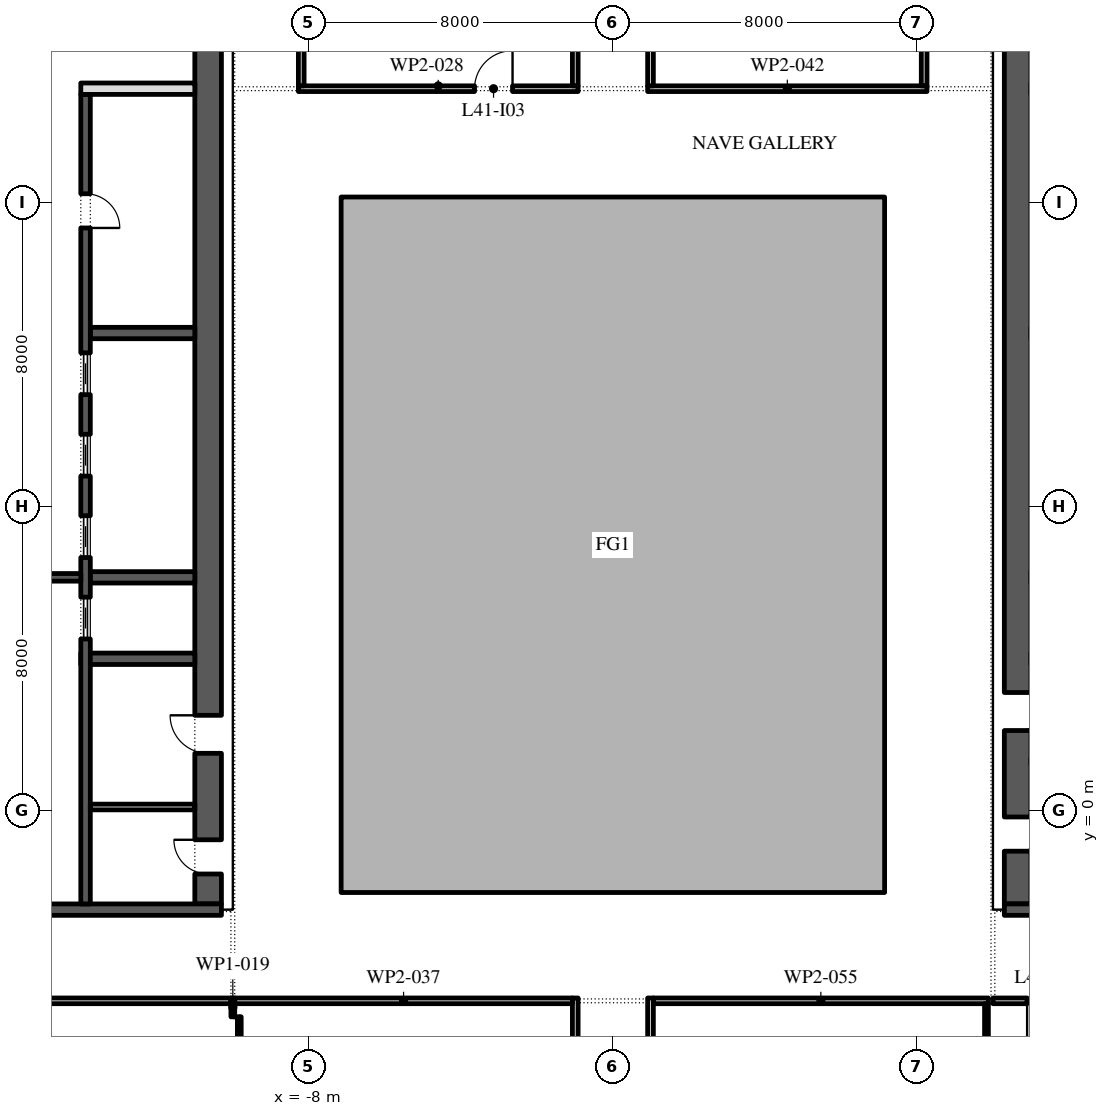
"""IFC4 building model, lengths in metres.
Left out: names, types, materials, properties, quantities, classifications, styles, units other than length and angle.
Written with IfcOpenShell. Run it as: python <this file> out.ifc"""

import sys

from ifc_helpers import new_model, si_unit, direction, frame, frame_2d, origin, place, context, subcontext, project, spatial, polyline, rectangle, outline, extrude, element, fill, save


model = new_model("IFC4")
c1 = context("Model", 3, precision=1e-05, world=origin(), true_north=direction((0.0, 1.0)))
c2 = subcontext(c1, "Body", "Model", "MODEL_VIEW")
j1 = project(units=[si_unit("LENGTHUNIT", "METRE"), si_unit("PLANEANGLEUNIT", "RADIAN")], contexts=[c1])
p1 = place(None, origin())
s1 = spatial("IfcSite", under=j1, at=p1, CompositionType="ELEMENT")
p2 = place(p1, origin())
s2 = spatial("IfcBuilding", under=s1, at=p2, CompositionType="ELEMENT")
p3 = place(p2, frame((0.0, 0.0, 188.4)))
s3 = spatial("IfcBuildingStorey", under=s2, at=p3, CompositionType="ELEMENT", Elevation=188.4)
p4 = place(p3, origin())
e1 = element("IfcWall", 1, at=p4, inside=s3, PredefinedType="STANDARD", context=c2, shape_type="SweptSolid", body=[
    extrude(outline(polyline([(-7.15, -2.15), (7.15, -2.15), (7.15, 16.15), (-7.15, 16.15), (-7.15, -2.15)]), holes=[polyline([(-7.0, -2.0), (-7.0, 16.0), (7.0, 16.0), (7.0, -2.0), (-7.0, -2.0)])]), origin(), (0.0, 0.0, 1.0), 4.0),
])
p5 = place(p3, frame((-10.65, -2.45, 0.0), z_axis=(0.0, 0.0, 1.0), x_axis=(0.0, 1.0, 0.0)))
e2 = element("IfcWall", 2, at=p5, inside=s3, PredefinedType="SHEAR", context=c2, shape_type="SweptSolid", body=[
    extrude(rectangle(XDim=27.9, YDim=0.7, at=frame_2d((13.95, 0.0))), origin(), (0.0, 0.0, 1.0), 4.0),
])
p6 = place(p5, frame((23.65, 0.0, 0.0)))
e3 = element("IfcOpeningElement", 3, at=p6, cuts=e2, PredefinedType="OPENING", context=c2, shape_type="SweptSolid", body=[
    extrude(rectangle(XDim=2.4, YDim=2.1, at=frame_2d((1.2, 1.05))), frame((0.0, 0.36, 0.0), z_axis=(0.0, -1.0, 0.0), x_axis=(1.0, 0.0, 0.0)), (0.0, 0.0, 1.0), 0.72),
])
p7 = place(p5, frame((0.788, 0.0, 0.0)))
e4 = element("IfcOpeningElement", 4, at=p7, cuts=e2, PredefinedType="OPENING", context=c2, shape_type="SweptSolid", body=[
    extrude(rectangle(XDim=0.9, YDim=2.1, at=frame_2d((0.45, 1.05))), frame((0.0, 0.36, 0.0), z_axis=(0.0, -1.0, 0.0), x_axis=(1.0, 0.0, 0.0)), (0.0, 0.0, 1.0), 0.72),
])
p8 = place(p5, frame((3.962, 0.0, 0.0)))
e5 = element("IfcOpeningElement", 5, at=p8, cuts=e2, PredefinedType="OPENING", context=c2, shape_type="SweptSolid", body=[
    extrude(rectangle(XDim=1.0, YDim=2.1, at=frame_2d((0.5, 1.05))), frame((0.0, 0.36, 0.0), z_axis=(0.0, -1.0, 0.0), x_axis=(1.0, 0.0, 0.0)), (0.0, 0.0, 1.0), 0.72),
])
p9 = place(p3, frame((-21.7, -2.6, 0.0), z_axis=(0.0, 0.0, 1.0), x_axis=(1.0, 0.0, 0.0)))
e6 = element("IfcWall", 6, at=p9, inside=s3, PredefinedType="SHEAR", context=c2, shape_type="SweptSolid", body=[
    extrude(rectangle(XDim=11.4, YDim=0.3, at=frame_2d((5.7, 0.0))), origin(), (0.0, 0.0, 1.0), 4.0),
])
p10 = place(p3, frame((-14.0, 4.0, 0.0), z_axis=(0.0, 0.0, 1.0), x_axis=(1.0, 0.0, 0.0)))
e7 = element("IfcWall", 7, at=p10, inside=s3, PredefinedType="SHEAR", context=c2, shape_type="SweptSolid", body=[
    extrude(rectangle(XDim=3.0, YDim=0.3, at=frame_2d((1.5, 0.0))), origin(), (0.0, 0.0, 1.0), 4.0),
])
for number, where, z_axis, x_axis in (
    (8, (-13.75, 6.143, 0.0), (0.0, 0.0, 1.0), (1.0, 0.0, 0.0)),
    (9, (-13.75, 12.571, 0.0), (0.0, 0.0, 1.0), (1.0, 0.0, 0.0)),
):
    element("IfcWall", number, at=place(p3, frame(where, z_axis=z_axis, x_axis=x_axis)), inside=s3, PredefinedType="SHEAR", context=c2, shape_type="SweptSolid", body=[
        extrude(rectangle(XDim=2.75, YDim=0.3, at=frame_2d((1.375, 0.0))), origin(), (0.0, 0.0, 1.0), 4.0),
    ])
p11 = place(p3, frame((-13.875, -2.45, 0.0), z_axis=(0.0, 0.0, 1.0), x_axis=(0.0, 1.0, 0.0)))
e10 = element("IfcWall", 10, at=p11, inside=s3, PredefinedType="SHEAR", context=c2, shape_type="SweptSolid", body=[
    extrude(rectangle(XDim=21.3, YDim=0.25, at=frame_2d((10.65, 0.0))), origin(), (0.0, 0.0, 1.0), 4.0),
])
p12 = place(p11, frame((17.786, 0.0, 0.0)))
e11 = element("IfcOpeningElement", 11, at=p12, cuts=e10, PredefinedType="OPENING", context=c2, shape_type="SweptSolid", body=[
    extrude(rectangle(XDim=0.9, YDim=2.1, at=frame_2d((0.45, 1.05))), frame((0.0, 0.135, 0.0), z_axis=(0.0, -1.0, 0.0), x_axis=(1.0, 0.0, 0.0)), (0.0, 0.0, 1.0), 0.27),
])
p13 = place(p11, frame((6.971, 0.0, 0.0)))
e12 = element("IfcOpeningElement", 12, at=p13, cuts=e10, PredefinedType="OPENING", context=c2, shape_type="SweptSolid", body=[
    extrude(rectangle(XDim=1.1, YDim=2.1, at=frame_2d((0.55, 1.05))), frame((0.0, 0.135, 0.0), z_axis=(0.0, -1.0, 0.0), x_axis=(1.0, 0.0, 0.0)), (0.0, 0.0, 1.0), 0.27),
])
p14 = place(p11, frame((9.114, 0.0, 0.0)))
e13 = element("IfcOpeningElement", 13, at=p14, cuts=e10, PredefinedType="OPENING", context=c2, shape_type="SweptSolid", body=[
    extrude(rectangle(XDim=1.1, YDim=2.1, at=frame_2d((0.55, 1.05))), frame((0.0, 0.135, 0.0), z_axis=(0.0, -1.0, 0.0), x_axis=(1.0, 0.0, 0.0)), (0.0, 0.0, 1.0), 0.27),
])
p15 = place(p11, frame((11.257, 0.0, 0.0)))
e14 = element("IfcOpeningElement", 14, at=p15, cuts=e10, PredefinedType="OPENING", context=c2, shape_type="SweptSolid", body=[
    extrude(rectangle(XDim=1.1, YDim=2.1, at=frame_2d((0.55, 1.05))), frame((0.0, 0.135, 0.0), z_axis=(0.0, -1.0, 0.0), x_axis=(1.0, 0.0, 0.0)), (0.0, 0.0, 1.0), 0.27),
])
p16 = place(p11, frame((13.4, 0.0, 0.0)))
e15 = element("IfcOpeningElement", 15, at=p16, cuts=e10, PredefinedType="OPENING", context=c2, shape_type="SweptSolid", body=[
    extrude(rectangle(XDim=1.1, YDim=2.1, at=frame_2d((0.55, 1.05))), frame((0.0, 0.135, 0.0), z_axis=(0.0, -1.0, 0.0), x_axis=(1.0, 0.0, 0.0)), (0.0, 0.0, 1.0), 0.27),
])
p17 = place(p3, frame((-14.0, 19.0, 0.0), z_axis=(0.0, 0.0, 1.0), x_axis=(1.0, 0.0, 0.0)))
e16 = element("IfcWall", 16, at=p17, inside=s3, PredefinedType="PARTITIONING", context=c2, shape_type="SweptSolid", body=[
    extrude(rectangle(XDim=3.0, YDim=0.3, at=frame_2d((1.5, 0.0))), origin(), (0.0, 0.0, 1.0), 4.0),
])
p18 = place(p3, frame((-18.0, 6.143, 0.0), z_axis=(0.0, 0.0, 1.0), x_axis=(1.0, 0.0, 0.0)))
e17 = element("IfcWall", 17, at=p18, inside=s3, PredefinedType="SHEAR", context=c2, shape_type="SweptSolid", body=[
    extrude(rectangle(XDim=4.0, YDim=0.2, at=frame_2d((2.0, 0.0))), origin(), (0.0, 0.0, 1.0), 4.0),
])
p19 = place(p18, frame((1.4, 0.0, 0.0)))
e18 = element("IfcOpeningElement", 18, at=p19, cuts=e17, PredefinedType="OPENING", context=c2, shape_type="SweptSolid", body=[
    extrude(rectangle(XDim=1.2, YDim=2.1, at=frame_2d((0.6, 1.05))), frame((0.0, 0.11, 0.0), z_axis=(0.0, -1.0, 0.0), x_axis=(1.0, 0.0, 0.0)), (0.0, 0.0, 1.0), 0.22),
])
p20 = place(p3, frame((-13.75, 0.1, 0.0), z_axis=(0.0, 0.0, 1.0), x_axis=(1.0, 0.0, 0.0)))
e19 = element("IfcWall", 19, at=p20, inside=s3, PredefinedType="PARTITIONING", context=c2, shape_type="SweptSolid", body=[
    extrude(rectangle(XDim=2.75, YDim=0.15, at=frame_2d((1.375, 0.0))), origin(), (0.0, 0.0, 1.0), 4.0),
])
p21 = place(p3, frame((10.65, -2.45, 0.0), z_axis=(0.0, 0.0, 1.0), x_axis=(0.0, 1.0, 0.0)))
e20 = element("IfcWall", 20, at=p21, inside=s3, PredefinedType="SHEAR", context=c2, shape_type="SweptSolid", body=[
    extrude(rectangle(XDim=27.9, YDim=0.7, at=frame_2d((13.95, 0.0))), origin(), (0.0, 0.0, 1.0), 4.0),
])
p22 = place(p21, frame((23.65, 0.0, 0.0)))
e21 = element("IfcOpeningElement", 21, at=p22, cuts=e20, PredefinedType="OPENING", context=c2, shape_type="SweptSolid", body=[
    extrude(rectangle(XDim=2.4, YDim=2.1, at=frame_2d((1.2, 1.05))), frame((0.0, 0.36, 0.0), z_axis=(0.0, -1.0, 0.0), x_axis=(1.0, 0.0, 0.0)), (0.0, 0.0, 1.0), 0.72),
])
p23 = place(p21, frame((1.387, 0.0, 0.0)))
e22 = element("IfcOpeningElement", 22, at=p23, cuts=e20, PredefinedType="OPENING", context=c2, shape_type="SweptSolid", body=[
    extrude(rectangle(XDim=0.9, YDim=2.1, at=frame_2d((0.45, 1.05))), frame((0.0, 0.36, 0.0), z_axis=(0.0, -1.0, 0.0), x_axis=(1.0, 0.0, 0.0)), (0.0, 0.0, 1.0), 0.72),
])
p24 = place(p21, frame((4.562, 0.0, 0.0)))
e23 = element("IfcOpeningElement", 23, at=p24, cuts=e20, PredefinedType="OPENING", context=c2, shape_type="SweptSolid", body=[
    extrude(rectangle(XDim=1.0, YDim=2.1, at=frame_2d((0.5, 1.05))), frame((0.0, 0.36, 0.0), z_axis=(0.0, -1.0, 0.0), x_axis=(1.0, 0.0, 0.0)), (0.0, 0.0, 1.0), 0.72),
])
p25 = place(p3, frame((10.3, -2.6, 0.0), z_axis=(0.0, 0.0, 1.0), x_axis=(1.0, 0.0, 0.0)))
e24 = element("IfcWall", 24, at=p25, inside=s3, PredefinedType="SHEAR", context=c2, shape_type="SweptSolid", body=[
    extrude(rectangle(XDim=11.4, YDim=0.3, at=frame_2d((5.7, 0.0))), origin(), (0.0, 0.0, 1.0), 4.0),
])
p26 = place(p3, frame((-10.0, -5.42, 0.0), z_axis=(0.0, 0.0, 1.0), x_axis=(0.0, 1.0, 0.0)))
e25 = element("IfcWall", 25, at=p26, inside=s3, PredefinedType="PARTITIONING", context=c2, shape_type="SweptSolid", body=[
    extrude(rectangle(XDim=0.495, YDim=0.1, at=frame_2d((0.248, 0.0))), origin(), (0.0, 0.0, 1.0), 4.0),
])
p27 = place(p3, frame((-10.05, -5.0, 0.0), z_axis=(0.0, 0.0, 1.0), x_axis=(-1.0, 0.0, 0.0)))
e26 = element("IfcWall", 26, at=p27, inside=s3, PredefinedType="PARTITIONING", context=c2, shape_type="SweptSolid", body=[
    extrude(rectangle(XDim=13.665, YDim=0.15, at=frame_2d((6.833, 0.0))), origin(), (0.0, 0.0, 1.0), 4.0),
])
p28 = place(p27, frame((5.09, 0.0, 0.0)))
e27 = element("IfcOpeningElement", 27, at=p28, cuts=e26, PredefinedType="OPENING", context=c2, shape_type="SweptSolid", body=[
    extrude(rectangle(XDim=1.0, YDim=2.1, at=frame_2d((0.5, 1.05))), frame((0.0, 0.085, 0.0), z_axis=(0.0, -1.0, 0.0), x_axis=(1.0, 0.0, 0.0)), (0.0, 0.0, 1.0), 0.17),
])
p29 = place(p3, frame((-9.83, -11.12, 0.0), z_axis=(0.0, 0.0, 1.0), x_axis=(0.0, 1.0, 0.0)))
e28 = element("IfcWall", 28, at=p29, inside=s3, PredefinedType="PARTITIONING", context=c2, shape_type="SweptSolid", body=[
    extrude(rectangle(XDim=5.7, YDim=0.1, at=frame_2d((2.85, 0.0))), origin(), (0.0, 0.0, 1.0), 4.0),
])
p30 = place(p3, frame((-8.275, 19.0, 0.0), z_axis=(0.0, 0.0, 1.0), x_axis=(1.0, 0.0, 0.0)))
e29 = element("IfcWall", 29, at=p30, inside=s3, PredefinedType="PARTITIONING", context=c2, shape_type="SweptSolid", body=[
    extrude(rectangle(XDim=7.36, YDim=0.15, at=frame_2d((3.68, 0.0))), origin(), (0.0, 0.0, 1.0), 4.0),
])
p31 = place(p30, frame((4.635, 0.0, 0.0)))
e30 = element("IfcOpeningElement", 30, at=p31, cuts=e29, PredefinedType="OPENING", context=c2, shape_type="SweptSolid", body=[
    extrude(rectangle(XDim=1.0, YDim=2.1, at=frame_2d((0.5, 1.05))), frame((0.0, 0.085, 0.0), z_axis=(0.0, -1.0, 0.0), x_axis=(1.0, 0.0, 0.0)), (0.0, 0.0, 1.0), 0.17),
])
p32 = place(p3, frame((-8.2, 23.565, 0.0), z_axis=(0.0, 0.0, 1.0), x_axis=(0.0, -1.0, 0.0)))
e31 = element("IfcWall", 31, at=p32, inside=s3, PredefinedType="PARTITIONING", context=c2, shape_type="SweptSolid", body=[
    extrude(rectangle(XDim=4.49, YDim=0.15, at=frame_2d((2.245, 0.0))), origin(), (0.0, 0.0, 1.0), 4.0),
])
p33 = place(p3, frame((-0.99, -16.753, 0.0), z_axis=(0.0, 0.0, 1.0), x_axis=(0.0, 1.0, 0.0)))
e32 = element("IfcWall", 32, at=p33, inside=s3, PredefinedType="PARTITIONING", context=c2, shape_type="SweptSolid", body=[
    extrude(rectangle(XDim=11.828, YDim=0.15, at=frame_2d((5.914, 0.0))), origin(), (0.0, 0.0, 1.0), 4.0),
])
p34 = place(p33, frame((2.853, 0.0, 0.0)))
e33 = element("IfcOpeningElement", 33, at=p34, cuts=e32, PredefinedType="OPENING", context=c2, shape_type="SweptSolid", body=[
    extrude(rectangle(XDim=1.0, YDim=2.1, at=frame_2d((0.5, 1.05))), frame((0.0, 0.085, 0.0), z_axis=(0.0, -1.0, 0.0), x_axis=(1.0, 0.0, 0.0)), (0.0, 0.0, 1.0), 0.17),
])
p35 = place(p3, frame((-1.065, -5.0, 0.0), z_axis=(0.0, 0.0, 1.0), x_axis=(-1.0, 0.0, 0.0)))
e34 = element("IfcWall", 34, at=p35, inside=s3, PredefinedType="PARTITIONING", context=c2, shape_type="SweptSolid", body=[
    extrude(rectangle(XDim=8.885, YDim=0.15, at=frame_2d((4.442, 0.0))), origin(), (0.0, 0.0, 1.0), 4.0),
])
p36 = place(p3, frame((-0.99, 19.075, 0.0), z_axis=(0.0, 0.0, 1.0), x_axis=(0.0, 1.0, 0.0)))
e35 = element("IfcWall", 35, at=p36, inside=s3, PredefinedType="PARTITIONING", context=c2, shape_type="SweptSolid", body=[
    extrude(rectangle(XDim=4.365, YDim=0.15, at=frame_2d((2.183, 0.0))), origin(), (0.0, 0.0, 1.0), 4.0),
])
p37 = place(p3, frame((0.99, -4.925, 0.0), z_axis=(0.0, 0.0, 1.0), x_axis=(0.0, -1.0, 0.0)))
e36 = element("IfcWall", 36, at=p37, inside=s3, PredefinedType="PARTITIONING", context=c2, shape_type="SweptSolid", body=[
    extrude(rectangle(XDim=11.371, YDim=0.15, at=frame_2d((5.686, 0.0))), origin(), (0.0, 0.0, 1.0), 4.0),
])
p38 = place(p37, frame((2.945, 0.0, 0.0)))
e37 = element("IfcOpeningElement", 37, at=p38, cuts=e36, PredefinedType="OPENING", context=c2, shape_type="SweptSolid", body=[
    extrude(rectangle(XDim=1.0, YDim=2.1, at=frame_2d((0.5, 1.05))), frame((0.0, 0.085, 0.0), z_axis=(0.0, -1.0, 0.0), x_axis=(1.0, 0.0, 0.0)), (0.0, 0.0, 1.0), 0.17),
])
p39 = place(p3, frame((0.915, 19.0, 0.0), z_axis=(0.0, 0.0, 1.0), x_axis=(1.0, 0.0, 0.0)))
e38 = element("IfcWall", 38, at=p39, inside=s3, PredefinedType="PARTITIONING", context=c2, shape_type="SweptSolid", body=[
    extrude(rectangle(XDim=7.35, YDim=0.15, at=frame_2d((3.675, 0.0))), origin(), (0.0, 0.0, 1.0), 4.0),
])
p40 = place(p3, frame((0.99, 27.55, 0.0), z_axis=(0.0, 0.0, 1.0), x_axis=(0.0, -1.0, 0.0)))
e39 = element("IfcWall", 39, at=p40, inside=s3, PredefinedType="PARTITIONING", context=c2, shape_type="SweptSolid", body=[
    extrude(rectangle(XDim=8.475, YDim=0.15, at=frame_2d((4.238, 0.0))), origin(), (0.0, 0.0, 1.0), 4.0),
])
p41 = place(p40, frame((4.65, 0.0, 0.0)))
e40 = element("IfcOpeningElement", 40, at=p41, cuts=e39, PredefinedType="OPENING", context=c2, shape_type="SweptSolid", body=[
    extrude(rectangle(XDim=1.0, YDim=2.1, at=frame_2d((0.5, 1.05))), frame((0.0, 0.085, 0.0), z_axis=(0.0, -1.0, 0.0), x_axis=(1.0, 0.0, 0.0)), (0.0, 0.0, 1.0), 0.17),
])
p42 = place(p3, frame((8.19, 19.075, 0.0), z_axis=(0.0, 0.0, 1.0), x_axis=(0.0, 1.0, 0.0)))
e41 = element("IfcWall", 41, at=p42, inside=s3, PredefinedType="PARTITIONING", context=c2, shape_type="SweptSolid", body=[
    extrude(rectangle(XDim=8.065, YDim=0.15, at=frame_2d((4.032, 0.0))), origin(), (0.0, 0.0, 1.0), 4.0),
])
p43 = place(p3, frame((9.88, -5.0, 0.0), z_axis=(0.0, 0.0, 1.0), x_axis=(-1.0, 0.0, 0.0)))
e42 = element("IfcWall", 42, at=p43, inside=s3, PredefinedType="PARTITIONING", context=c2, shape_type="SweptSolid", body=[
    extrude(rectangle(XDim=8.815, YDim=0.15, at=frame_2d((4.407, 0.0))), origin(), (0.0, 0.0, 1.0), 4.0),
])
p44 = place(p3, frame((9.83, -5.075, 0.0), z_axis=(0.0, 0.0, 1.0), x_axis=(0.0, -1.0, 0.0)))
e43 = element("IfcWall", 43, at=p44, inside=s3, PredefinedType="PARTITIONING", context=c2, shape_type="SweptSolid", body=[
    extrude(rectangle(XDim=9.18, YDim=0.1, at=frame_2d((4.59, 0.0))), origin(), (0.0, 0.0, 1.0), 4.0),
])
p45 = place(p3, frame((14.43, -5.0, 0.0), z_axis=(0.0, 0.0, 1.0), x_axis=(-1.0, 0.0, 0.0)))
e44 = element("IfcWall", 44, at=p45, inside=s3, PredefinedType="PARTITIONING", context=c2, shape_type="SweptSolid", body=[
    extrude(rectangle(XDim=4.43, YDim=0.15, at=frame_2d((2.215, 0.0))), origin(), (0.0, 0.0, 1.0), 4.0),
])
p46 = place(p45, frame((2.53, 0.0, 0.0)))
e45 = element("IfcOpeningElement", 45, at=p46, cuts=e44, PredefinedType="OPENING", context=c2, shape_type="SweptSolid", body=[
    extrude(rectangle(XDim=1.0, YDim=2.1, at=frame_2d((0.5, 1.05))), frame((0.0, 0.085, 0.0), z_axis=(0.0, -1.0, 0.0), x_axis=(1.0, 0.0, 0.0)), (0.0, 0.0, 1.0), 0.17),
])
p47 = place(p12, frame((0.9, -0.2, 0.0), z_axis=(0.0, 0.0, 1.0), x_axis=(-1.0, 0.0, 0.0)))
e46 = element("IfcDoor", 46, at=p47, inside=s3, OperationType="SINGLE_SWING_LEFT", PredefinedType="DOOR", context=c2, shape_type="SweptSolid", body=[
    extrude(rectangle(XDim=0.9, YDim=2.1, at=frame_2d((0.45, 1.05))), frame((0.0, -0.075, 0.0), z_axis=(0.0, -1.0, 0.0), x_axis=(1.0, 0.0, 0.0)), (0.0, 0.0, 1.0), 0.05),
])
fill(e11, e46)
p48 = place(p13, origin())
e47 = element("IfcDoor", 47, at=p48, inside=s3, OperationType="SLIDING_TO_LEFT", PredefinedType="DOOR", context=c2, shape_type="SweptSolid", body=[
    extrude(rectangle(XDim=1.1, YDim=2.1, at=frame_2d((0.55, 1.05))), frame((0.0, 0.025, 0.0), z_axis=(0.0, -1.0, 0.0), x_axis=(1.0, 0.0, 0.0)), (0.0, 0.0, 1.0), 0.05),
])
fill(e12, e47)
p49 = place(p14, origin())
e48 = element("IfcDoor", 48, at=p49, inside=s3, OperationType="SLIDING_TO_LEFT", PredefinedType="DOOR", context=c2, shape_type="SweptSolid", body=[
    extrude(rectangle(XDim=1.1, YDim=2.1, at=frame_2d((0.55, 1.05))), frame((0.0, 0.025, 0.0), z_axis=(0.0, -1.0, 0.0), x_axis=(1.0, 0.0, 0.0)), (0.0, 0.0, 1.0), 0.05),
])
fill(e13, e48)
p50 = place(p15, origin())
e49 = element("IfcDoor", 49, at=p50, inside=s3, OperationType="SLIDING_TO_LEFT", PredefinedType="DOOR", context=c2, shape_type="SweptSolid", body=[
    extrude(rectangle(XDim=1.1, YDim=2.1, at=frame_2d((0.55, 1.05))), frame((0.0, 0.025, 0.0), z_axis=(0.0, -1.0, 0.0), x_axis=(1.0, 0.0, 0.0)), (0.0, 0.0, 1.0), 0.05),
])
fill(e14, e49)
p51 = place(p16, origin())
e50 = element("IfcDoor", 50, at=p51, inside=s3, OperationType="SLIDING_TO_LEFT", PredefinedType="DOOR", context=c2, shape_type="SweptSolid", body=[
    extrude(rectangle(XDim=1.1, YDim=2.1, at=frame_2d((0.55, 1.05))), frame((0.0, 0.025, 0.0), z_axis=(0.0, -1.0, 0.0), x_axis=(1.0, 0.0, 0.0)), (0.0, 0.0, 1.0), 0.05),
])
fill(e15, e50)
p52 = place(p7, origin())
e51 = element("IfcDoor", 51, at=p52, inside=s3, OperationType="SINGLE_SWING_LEFT", PredefinedType="DOOR", context=c2, shape_type="SweptSolid", body=[
    extrude(rectangle(XDim=0.9, YDim=2.1, at=frame_2d((0.45, 1.05))), frame((0.0, 0.35, 0.0), z_axis=(0.0, -1.0, 0.0), x_axis=(1.0, 0.0, 0.0)), (0.0, 0.0, 1.0), 0.05),
])
fill(e4, e51)
p53 = place(p8, origin())
e52 = element("IfcDoor", 52, at=p53, inside=s3, OperationType="SINGLE_SWING_LEFT", PredefinedType="DOOR", context=c2, shape_type="SweptSolid", body=[
    extrude(rectangle(XDim=1.0, YDim=2.1, at=frame_2d((0.5, 1.05))), frame((0.0, 0.35, 0.0), z_axis=(0.0, -1.0, 0.0), x_axis=(1.0, 0.0, 0.0)), (0.0, 0.0, 1.0), 0.05),
])
fill(e5, e52)
p54 = place(p31, origin())
e53 = element("IfcDoor", 53, at=p54, inside=s3, OperationType="SINGLE_SWING_LEFT", PredefinedType="DOOR", context=c2, shape_type="SweptSolid", body=[
    extrude(rectangle(XDim=1.0, YDim=2.1, at=frame_2d((0.5, 1.05))), frame((0.0, 0.025, 0.0), z_axis=(0.0, -1.0, 0.0), x_axis=(1.0, 0.0, 0.0)), (0.0, 0.0, 1.0), 0.05),
])
fill(e30, e53)
p55 = place(p46, origin())
e54 = element("IfcDoor", 54, at=p55, inside=s3, OperationType="SINGLE_SWING_LEFT", PredefinedType="DOOR", context=c2, shape_type="SweptSolid", body=[
    extrude(rectangle(XDim=1.0, YDim=2.1, at=frame_2d((0.5, 1.05))), frame((0.0, 0.025, 0.0), z_axis=(0.0, -1.0, 0.0), x_axis=(1.0, 0.0, 0.0)), (0.0, 0.0, 1.0), 0.05),
])
fill(e45, e54)
save(model, sys.argv[1])
